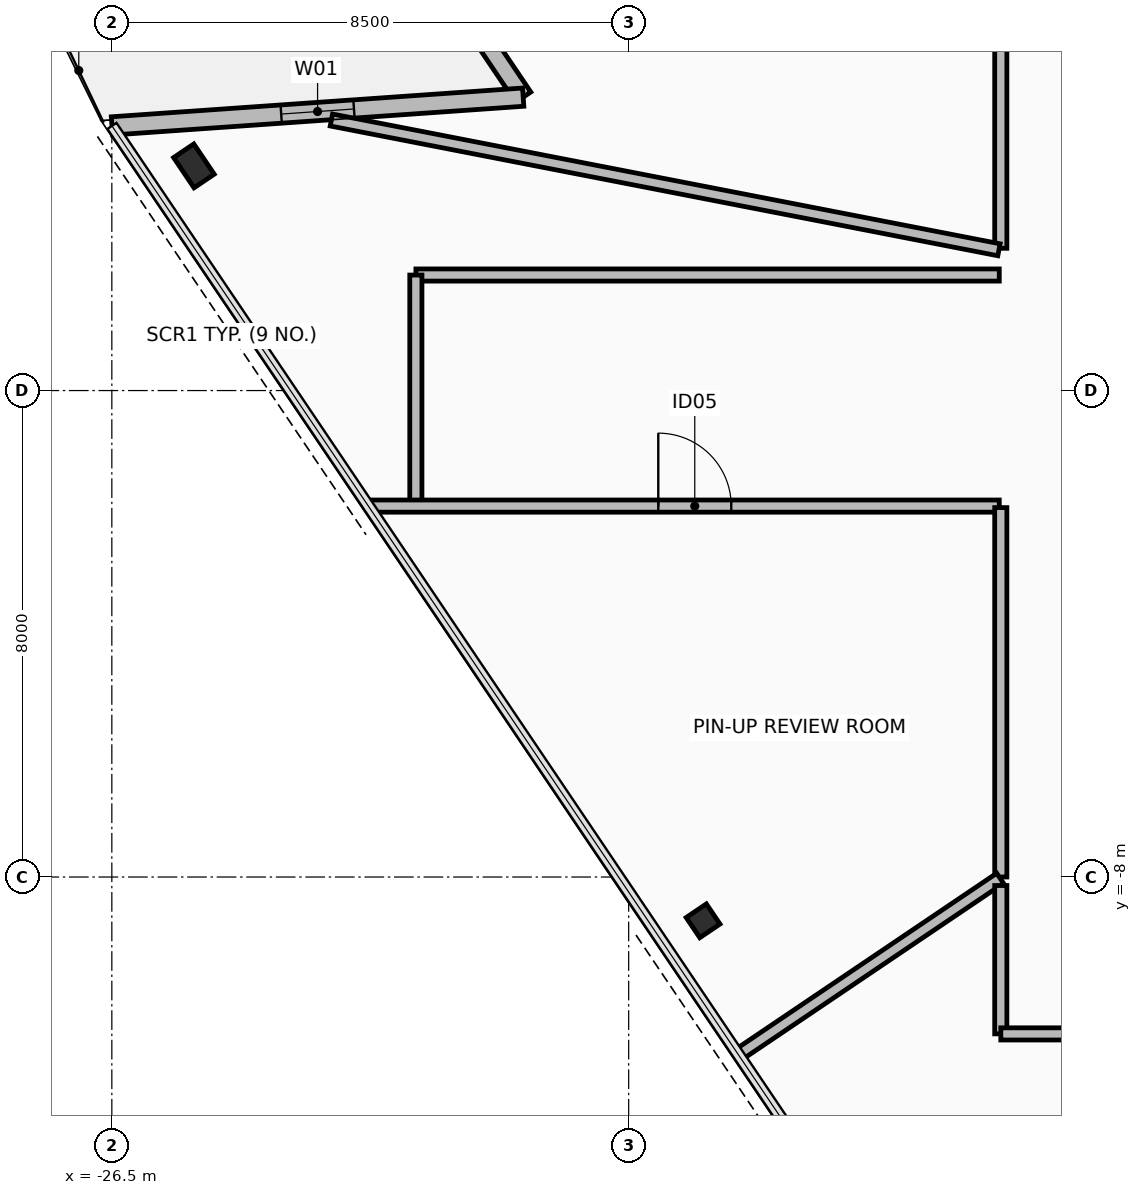
"""IFC4 building model, lengths in metres.
Left out: names, types, materials, properties, quantities, classifications, styles, units other than length and angle.
Written with IfcOpenShell. Run it as: python <this file> out.ifc"""

import sys

from ifc_helpers import new_model, si_unit, direction, frame, frame_2d, origin, origin_2d, place, context, subcontext, project, spatial, rectangle, hollow_rectangle, extrude, element, fill, save


model = new_model("IFC4")
c1 = context("Model", 3, precision=1e-05, world=origin(), true_north=direction((0.0, 1.0)))
c2 = subcontext(c1, "Body", "Model", "MODEL_VIEW")
j1 = project(units=[si_unit("LENGTHUNIT", "METRE"), si_unit("PLANEANGLEUNIT", "RADIAN")], contexts=[c1])
p1 = place(None, origin())
s1 = spatial("IfcSite", under=j1, at=p1, CompositionType="ELEMENT")
p2 = place(p1, origin())
s2 = spatial("IfcBuilding", under=s1, at=p2, CompositionType="ELEMENT")
p3 = place(p2, frame((0.0, 0.0, 264.2)))
s3 = spatial("IfcBuildingStorey", under=s2, at=p3, CompositionType="ELEMENT", Elevation=264.2)
p4 = place(p3, frame((-25.15, 3.695, 0.0), z_axis=(0.0, 0.0, 1.0), x_axis=(-0.559192903471, 0.829037572555, 0.0)))
e1 = element("IfcColumn", 1, at=p4, inside=s3, PredefinedType="COLUMN", context=c2, shape_type="SweptSolid", body=[
    extrude(hollow_rectangle(XDim=0.4, YDim=0.6, WallThickness=0.03, at=origin_2d()), origin(), (0.0, 0.0, 1.0), 3.6),
])
p5 = place(p3, frame((-16.776, -8.72, 0.0), z_axis=(0.0, 0.0, 1.0), x_axis=(-0.559192903471, 0.829037572555, 0.0)))
e2 = element("IfcColumn", 2, at=p5, inside=s3, PredefinedType="COLUMN", context=c2, shape_type="SweptSolid", body=[
    extrude(hollow_rectangle(XDim=0.4, YDim=0.4, WallThickness=0.025, at=origin_2d()), origin(), (0.0, 0.0, 1.0), 3.6),
])
p6 = place(p3, frame((-23.526, 10.446, 0.0), z_axis=(0.0, 0.0, 1.0), x_axis=(0.559187716425, -0.829041071238, 0.0)))
e3 = element("IfcWall", 3, at=p6, inside=s3, PredefinedType="STANDARD", context=c2, shape_type="SweptSolid", body=[
    extrude(rectangle(XDim=6.78, YDim=0.3, at=frame_2d((3.39, 0.0))), origin(), (0.0, 0.0, 1.0), 2.765),
])
p7 = place(p6, frame((3.186, 0.0, 0.0)))
e4 = element("IfcOpeningElement", 4, at=p7, cuts=e3, PredefinedType="OPENING", context=c2, shape_type="SweptSolid", body=[
    extrude(rectangle(XDim=1.1, YDim=2.2, at=frame_2d((0.55, 1.1))), frame((0.0, 0.16, 0.0), z_axis=(0.0, -1.0, 0.0), x_axis=(1.0, 0.0, 0.0)), (0.0, 0.0, 1.0), 0.32),
])
p8 = place(p3, frame((-19.735, 4.825, 0.0), z_axis=(0.0, 0.0, 1.0), x_axis=(-0.997564507468, -0.06974993506, 0.0)))
e5 = element("IfcWall", 5, at=p8, inside=s3, PredefinedType="STANDARD", context=c2, shape_type="SweptSolid", body=[
    extrude(rectangle(XDim=6.78, YDim=0.3, at=frame_2d((3.39, 0.0))), origin(), (0.0, 0.0, 1.0), 2.765),
])
p9 = place(p8, frame((2.79, 0.0, 0.485)))
e6 = element("IfcOpeningElement", 6, at=p9, cuts=e5, PredefinedType="OPENING", context=c2, shape_type="SweptSolid", body=[
    extrude(rectangle(XDim=1.2, YDim=2.1, at=frame_2d((0.6, 1.05))), frame((0.0, 0.16, 0.0), z_axis=(0.0, -1.0, 0.0), x_axis=(1.0, 0.0, 0.0)), (0.0, 0.0, 1.0), 0.32),
])
p10 = place(p3, frame((-11.88, 11.26, 0.0), z_axis=(0.0, 0.0, 1.0), x_axis=(0.0, -1.0, 0.0)))
e7 = element("IfcWall", 7, at=p10, inside=s3, PredefinedType="PARTITIONING", context=c2, shape_type="SweptSolid", body=[
    extrude(rectangle(XDim=8.921, YDim=0.2, at=frame_2d((4.46, 0.0))), origin(), (0.0, 0.0, 1.0), 2.765),
])
p11 = place(p10, frame((4.091, 0.0, 0.0)))
e8 = element("IfcOpeningElement", 8, at=p11, cuts=e7, PredefinedType="OPENING", context=c2, shape_type="SweptSolid", body=[
    extrude(rectangle(XDim=1.0, YDim=2.15, at=frame_2d((0.5, 1.075))), frame((0.0, 0.11, 0.0), z_axis=(0.0, -1.0, 0.0), x_axis=(1.0, 0.0, 0.0)), (0.0, 0.0, 1.0), 0.22),
])
p12 = place(p3, frame((-11.91, 2.315, 0.0), z_axis=(0.0, 0.0, 1.0), x_axis=(-0.981625839426, 0.190815909638, 0.0)))
e9 = element("IfcWall", 9, at=p12, inside=s3, PredefinedType="PARTITIONING", context=c2, shape_type="SweptSolid", body=[
    extrude(rectangle(XDim=11.185, YDim=0.2, at=frame_2d((5.593, 0.0))), origin(), (0.0, 0.0, 1.0), 2.915),
])
p13 = place(p3, frame((-11.905, 1.9, 0.0), z_axis=(0.0, 0.0, 1.0), x_axis=(-1.0, 0.0, 0.0)))
e10 = element("IfcWall", 10, at=p13, inside=s3, PredefinedType="PARTITIONING", context=c2, shape_type="SweptSolid", body=[
    extrude(rectangle(XDim=9.594, YDim=0.2, at=frame_2d((4.797, 0.0))), origin(), (0.0, 0.0, 1.0), 3.115),
])
p14 = place(p3, frame((-21.5, 1.899, 0.0), z_axis=(0.0, 0.0, 1.0), x_axis=(0.0, -1.0, 0.0)))
e11 = element("IfcWall", 11, at=p14, inside=s3, PredefinedType="PARTITIONING", context=c2, shape_type="SweptSolid", body=[
    extrude(rectangle(XDim=3.799, YDim=0.2, at=frame_2d((1.899, 0.0))), origin(), (0.0, 0.0, 1.0), 2.765),
])
p15 = place(p3, frame((-22.281, -1.9, 0.0), z_axis=(0.0, 0.0, 1.0), x_axis=(1.0, 0.0, 0.0)))
e12 = element("IfcWall", 12, at=p15, inside=s3, PredefinedType="PARTITIONING", context=c2, shape_type="SweptSolid", body=[
    extrude(rectangle(XDim=10.376, YDim=0.2, at=frame_2d((5.188, 0.0))), origin(), (0.0, 0.0, 1.0), 2.765),
])
p16 = place(p15, frame((4.768, 0.0, 0.0)))
e13 = element("IfcOpeningElement", 13, at=p16, cuts=e12, PredefinedType="OPENING", context=c2, shape_type="SweptSolid", body=[
    extrude(rectangle(XDim=1.2, YDim=2.15, at=frame_2d((0.6, 1.075))), frame((0.0, 0.11, 0.0), z_axis=(0.0, -1.0, 0.0), x_axis=(1.0, 0.0, 0.0)), (0.0, 0.0, 1.0), 0.22),
])
p17 = place(p3, frame((-11.88, -1.925, 0.0), z_axis=(0.0, 0.0, 1.0), x_axis=(0.0, -1.0, 0.0)))
e14 = element("IfcWall", 14, at=p17, inside=s3, PredefinedType="PARTITIONING", context=c2, shape_type="SweptSolid", body=[
    extrude(rectangle(XDim=6.075, YDim=0.2, at=frame_2d((3.038, 0.0))), origin(), (0.0, 0.0, 1.0), 2.915),
])
p18 = place(p3, frame((-11.891, -8.021, 0.0), z_axis=(0.0, 0.0, 1.0), x_axis=(-0.829020667263, -0.55921796578, 0.0)))
e15 = element("IfcWall", 15, at=p18, inside=s3, PredefinedType="PARTITIONING", context=c2, shape_type="SweptSolid", body=[
    extrude(rectangle(XDim=5.166, YDim=0.2, at=frame_2d((2.583, 0.0))), origin(), (0.0, 0.0, 1.0), 2.765),
])
p19 = place(p3, frame((-11.88, -8.14, 0.0), z_axis=(0.0, 0.0, 1.0), x_axis=(0.0, -1.0, 0.0)))
e16 = element("IfcWall", 16, at=p19, inside=s3, PredefinedType="PARTITIONING", context=c2, shape_type="SweptSolid", body=[
    extrude(rectangle(XDim=2.439, YDim=0.2, at=frame_2d((1.22, 0.0))), origin(), (0.0, 0.0, 1.0), 2.915),
])
p20 = place(p3, frame((-11.879, -10.58, 0.0), z_axis=(0.0, 0.0, 1.0), x_axis=(1.0, 0.0, 0.0)))
e17 = element("IfcWall", 17, at=p20, inside=s3, PredefinedType="PARTITIONING", context=c2, shape_type="SweptSolid", body=[
    extrude(rectangle(XDim=9.792, YDim=0.2, at=frame_2d((4.896, 0.0))), origin(), (0.0, 0.0, 1.0), 2.915),
])
p21 = place(p20, frame((4.446, 0.0, 0.0)))
e18 = element("IfcOpeningElement", 18, at=p21, cuts=e17, PredefinedType="OPENING", context=c2, shape_type="SweptSolid", body=[
    extrude(rectangle(XDim=0.9, YDim=2.1, at=frame_2d((0.45, 1.05))), frame((0.0, 0.11, 0.0), z_axis=(0.0, -1.0, 0.0), x_axis=(1.0, 0.0, 0.0)), (0.0, 0.0, 1.0), 0.22),
])
p22 = place(p9, origin())
e19 = element("IfcWindow", 19, at=p22, inside=s3, PartitioningType="SINGLE_PANEL", PredefinedType="WINDOW", context=c2, shape_type="SweptSolid", body=[
    extrude(rectangle(XDim=1.2, YDim=2.1, at=frame_2d((0.6, 1.05))), frame((0.0, 0.03, 0.0), z_axis=(0.0, -1.0, 0.0), x_axis=(1.0, 0.0, 0.0)), (0.0, 0.0, 1.0), 0.06),
])
fill(e6, e19)
p23 = place(p16, origin())
e20 = element("IfcDoor", 20, at=p23, inside=s3, OperationType="SINGLE_SWING_LEFT", PredefinedType="DOOR", context=c2, shape_type="SweptSolid", body=[
    extrude(rectangle(XDim=1.2, YDim=2.15, at=frame_2d((0.6, 1.075))), frame((0.0, 0.025, 0.0), z_axis=(0.0, -1.0, 0.0), x_axis=(1.0, 0.0, 0.0)), (0.0, 0.0, 1.0), 0.05),
])
fill(e13, e20)
save(model, sys.argv[1])
